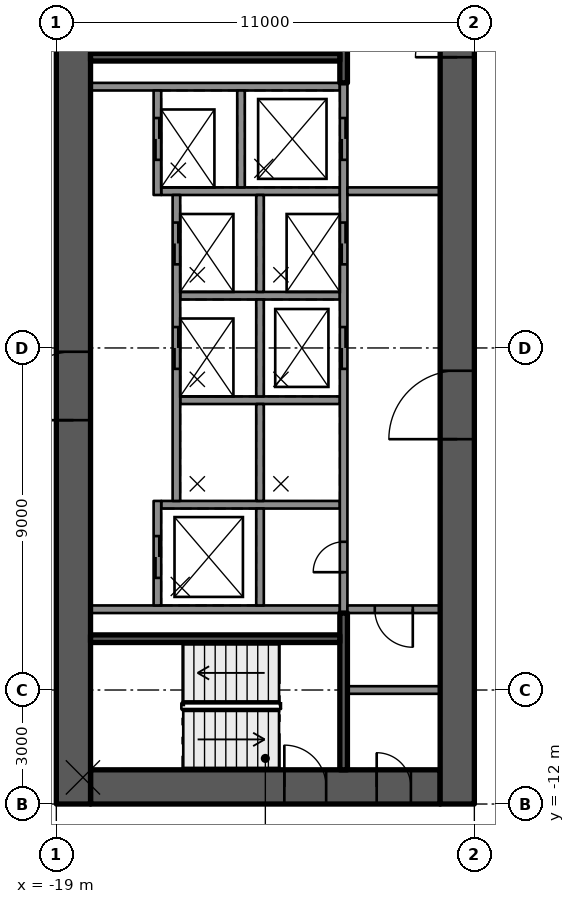
"""IFC4 building model, lengths in metres.
Left out: names, types, materials, properties, quantities, classifications, styles, units other than length and angle.
Written with IfcOpenShell. Run it as: python <this file> out.ifc"""

import sys

from ifc_helpers import new_model, si_unit, direction, frame, frame_2d, origin, place, context, subcontext, project, spatial, rectangle, extrude, element, fill, save


model = new_model("IFC4")
c1 = context("Model", 3, precision=1e-05, world=origin(), true_north=direction((0.0, 1.0)))
c2 = subcontext(c1, "Body", "Model", "MODEL_VIEW")
j1 = project(units=[si_unit("LENGTHUNIT", "METRE"), si_unit("PLANEANGLEUNIT", "RADIAN")], contexts=[c1])
p1 = place(None, origin())
s1 = spatial("IfcSite", under=j1, at=p1, CompositionType="ELEMENT")
p2 = place(p1, origin())
s2 = spatial("IfcBuilding", under=s1, at=p2, CompositionType="ELEMENT")
p3 = place(p2, frame((0.0, 0.0, 62.3)))
s3 = spatial("IfcBuildingStorey", under=s2, at=p3, CompositionType="ELEMENT", Elevation=62.3)
p4 = place(p3, frame((-18.1, -11.55, 0.0), z_axis=(0.0, 0.0, 1.0), x_axis=(1.0, 0.0, 0.0)))
e1 = element("IfcWall", 1, at=p4, inside=s3, PredefinedType="SHEAR", context=c2, shape_type="SweptSolid", body=[
    extrude(rectangle(XDim=9.2, YDim=0.9, at=frame_2d((4.6, 0.0))), origin(), (0.0, 0.0, 1.0), 3.5),
])
p5 = place(p4, frame((5.1, 0.0, 0.0)))
e2 = element("IfcOpeningElement", 2, at=p5, cuts=e1, PredefinedType="OPENING", context=c2, shape_type="SweptSolid", body=[
    extrude(rectangle(XDim=1.1, YDim=2.1, at=frame_2d((0.55, 1.05))), frame((0.0, 0.46, 0.0), z_axis=(0.0, -1.0, 0.0), x_axis=(1.0, 0.0, 0.0)), (0.0, 0.0, 1.0), 0.92),
])
p6 = place(p4, frame((7.53, 0.0, 0.0)))
e3 = element("IfcOpeningElement", 3, at=p6, cuts=e1, PredefinedType="OPENING", context=c2, shape_type="SweptSolid", body=[
    extrude(rectangle(XDim=0.9, YDim=2.1, at=frame_2d((0.45, 1.05))), frame((0.0, 0.46, 0.0), z_axis=(0.0, -1.0, 0.0), x_axis=(1.0, 0.0, 0.0)), (0.0, 0.0, 1.0), 0.92),
])
p7 = place(p3, frame((-18.55, -12.0, 0.0), z_axis=(0.0, 0.0, 1.0), x_axis=(0.0, 1.0, 0.0)))
e4 = element("IfcWall", 4, at=p7, inside=s3, PredefinedType="SHEAR", context=c2, shape_type="SweptSolid", body=[
    extrude(rectangle(XDim=24.0, YDim=0.9, at=frame_2d((12.0, 0.0))), origin(), (0.0, 0.0, 1.0), 3.5),
])
p8 = place(p7, frame((10.1, 0.0, 0.0)))
e5 = element("IfcOpeningElement", 5, at=p8, cuts=e4, PredefinedType="OPENING", context=c2, shape_type="SweptSolid", body=[
    extrude(rectangle(XDim=1.8, YDim=2.1, at=frame_2d((0.9, 1.05))), frame((0.0, 0.46, 0.0), z_axis=(0.0, -1.0, 0.0), x_axis=(1.0, 0.0, 0.0)), (0.0, 0.0, 1.0), 0.92),
])
p9 = place(p3, frame((-8.45, -12.0, 0.0), z_axis=(0.0, 0.0, 1.0), x_axis=(0.0, 1.0, 0.0)))
e6 = element("IfcWall", 6, at=p9, inside=s3, PredefinedType="SHEAR", context=c2, shape_type="SweptSolid", body=[
    extrude(rectangle(XDim=24.0, YDim=0.9, at=frame_2d((12.0, 0.0))), origin(), (0.0, 0.0, 1.0), 3.5),
])
p10 = place(p9, frame((9.6, 0.0, 0.0)))
e7 = element("IfcOpeningElement", 7, at=p10, cuts=e6, PredefinedType="OPENING", context=c2, shape_type="SweptSolid", body=[
    extrude(rectangle(XDim=1.8, YDim=2.1, at=frame_2d((0.9, 1.05))), frame((0.0, 0.46, 0.0), z_axis=(0.0, -1.0, 0.0), x_axis=(1.0, 0.0, 0.0)), (0.0, 0.0, 1.0), 0.92),
])
p11 = place(p9, frame((19.65, 0.0, 0.0)))
e8 = element("IfcOpeningElement", 8, at=p11, cuts=e6, PredefinedType="OPENING", context=c2, shape_type="SweptSolid", body=[
    extrude(rectangle(XDim=1.1, YDim=2.1, at=frame_2d((0.55, 1.05))), frame((0.0, 0.46, 0.0), z_axis=(0.0, -1.0, 0.0), x_axis=(1.0, 0.0, 0.0)), (0.0, 0.0, 1.0), 0.92),
])
for number, where, z_axis, x_axis in (
    (9, (-11.54, 6.875, 0.0), (0.0, 0.0, 1.0), (-1.0, 0.0, 0.0)),
    (10, (-11.54, -6.875, 0.0), (0.0, 0.0, 1.0), (-1.0, 0.0, 0.0)),
):
    element("IfcWall", number, at=place(p3, frame(where, z_axis=z_axis, x_axis=x_axis)), inside=s3, PredefinedType="SOLIDWALL", context=c2, shape_type="SweptSolid", body=[
        extrude(rectangle(XDim=6.56, YDim=0.2, at=frame_2d((3.28, 0.0))), origin(), (0.0, 0.0, 1.0), 3.09),
    ])
p12 = place(p3, frame((-11.54, -4.125, 0.0), z_axis=(0.0, 0.0, 1.0), x_axis=(-1.0, 0.0, 0.0)))
e11 = element("IfcWall", 11, at=p12, inside=s3, PredefinedType="SOLIDWALL", context=c2, shape_type="SweptSolid", body=[
    extrude(rectangle(XDim=4.7, YDim=0.2, at=frame_2d((2.35, 0.0))), origin(), (0.0, 0.0, 1.0), 3.09),
])
for number, where, z_axis, x_axis in (
    (12, (-11.54, -1.375, 0.0), (0.0, 0.0, 1.0), (-1.0, 0.0, 0.0)),
    (13, (-11.54, 1.375, 0.0), (0.0, 0.0, 1.0), (-1.0, 0.0, 0.0)),
):
    element("IfcWall", number, at=place(p3, frame(where, z_axis=z_axis, x_axis=x_axis)), inside=s3, PredefinedType="SOLIDWALL", context=c2, shape_type="SweptSolid", body=[
        extrude(rectangle(XDim=4.2, YDim=0.2, at=frame_2d((2.1, 0.0))), origin(), (0.0, 0.0, 1.0), 3.09),
    ])
p13 = place(p3, frame((-11.54, 4.125, 0.0), z_axis=(0.0, 0.0, 1.0), x_axis=(-1.0, 0.0, 0.0)))
e14 = element("IfcWall", 14, at=p13, inside=s3, PredefinedType="SOLIDWALL", context=c2, shape_type="SweptSolid", body=[
    extrude(rectangle(XDim=4.7, YDim=0.2, at=frame_2d((2.35, 0.0))), origin(), (0.0, 0.0, 1.0), 3.09),
])
p14 = place(p3, frame((-11.44, -6.975, 0.0), z_axis=(0.0, 0.0, 1.0), x_axis=(0.0, 1.0, 0.0)))
e15 = element("IfcWall", 15, at=p14, inside=s3, PredefinedType="SOLIDWALL", context=c2, shape_type="SweptSolid", body=[
    extrude(rectangle(XDim=13.95, YDim=0.2, at=frame_2d((6.975, 0.0))), origin(), (0.0, 0.0, 1.0), 3.09),
])
p15 = place(p14, frame((6.425, 0.0, 0.0)))
e16 = element("IfcOpeningElement", 16, at=p15, cuts=e15, PredefinedType="OPENING", context=c2, shape_type="SweptSolid", body=[
    extrude(rectangle(XDim=1.1, YDim=2.1, at=frame_2d((0.55, 1.05))), frame((0.0, 0.11, 0.0), z_axis=(0.0, -1.0, 0.0), x_axis=(1.0, 0.0, 0.0)), (0.0, 0.0, 1.0), 0.22),
])
p16 = place(p14, frame((9.175, 0.0, 0.0)))
e17 = element("IfcOpeningElement", 17, at=p16, cuts=e15, PredefinedType="OPENING", context=c2, shape_type="SweptSolid", body=[
    extrude(rectangle(XDim=1.1, YDim=2.1, at=frame_2d((0.55, 1.05))), frame((0.0, 0.11, 0.0), z_axis=(0.0, -1.0, 0.0), x_axis=(1.0, 0.0, 0.0)), (0.0, 0.0, 1.0), 0.22),
])
p17 = place(p14, frame((11.925, 0.0, 0.0)))
e18 = element("IfcOpeningElement", 18, at=p17, cuts=e15, PredefinedType="OPENING", context=c2, shape_type="SweptSolid", body=[
    extrude(rectangle(XDim=1.1, YDim=2.1, at=frame_2d((0.55, 1.05))), frame((0.0, 0.11, 0.0), z_axis=(0.0, -1.0, 0.0), x_axis=(1.0, 0.0, 0.0)), (0.0, 0.0, 1.0), 0.22),
])
p18 = place(p14, frame((1.075, 0.0, 0.0)))
e19 = element("IfcOpeningElement", 19, at=p18, cuts=e15, PredefinedType="OPENING", context=c2, shape_type="SweptSolid", body=[
    extrude(rectangle(XDim=0.8, YDim=2.1, at=frame_2d((0.4, 1.05))), frame((0.0, 0.11, 0.0), z_axis=(0.0, -1.0, 0.0), x_axis=(1.0, 0.0, 0.0)), (0.0, 0.0, 1.0), 0.22),
])
for number, where, z_axis, x_axis in (
    (20, (-13.64, -6.775, 0.0), (0.0, 0.0, 1.0), (0.0, 1.0, 0.0)),
    (21, (-13.64, -4.025, 0.0), (0.0, 0.0, 1.0), (0.0, 1.0, 0.0)),
    (22, (-13.64, -1.275, 0.0), (0.0, 0.0, 1.0), (0.0, 1.0, 0.0)),
    (23, (-13.64, 1.475, 0.0), (0.0, 0.0, 1.0), (0.0, 1.0, 0.0)),
    (24, (-14.14, 4.225, 0.0), (0.0, 0.0, 1.0), (0.0, 1.0, 0.0)),
):
    element("IfcWall", number, at=place(p3, frame(where, z_axis=z_axis, x_axis=x_axis)), inside=s3, PredefinedType="SOLIDWALL", context=c2, shape_type="SweptSolid", body=[
        extrude(rectangle(XDim=2.55, YDim=0.2, at=frame_2d((1.275, 0.0))), origin(), (0.0, 0.0, 1.0), 3.09),
    ])
p19 = place(p3, frame((-16.34, -6.775, 0.0), z_axis=(0.0, 0.0, 1.0), x_axis=(0.0, 1.0, 0.0)))
e25 = element("IfcWall", 25, at=p19, inside=s3, PredefinedType="SOLIDWALL", context=c2, shape_type="SweptSolid", body=[
    extrude(rectangle(XDim=2.75, YDim=0.2, at=frame_2d((1.375, 0.0))), origin(), (0.0, 0.0, 1.0), 3.09),
])
p20 = place(p19, frame((0.725, 0.0, 0.0)))
e26 = element("IfcOpeningElement", 26, at=p20, cuts=e25, PredefinedType="OPENING", context=c2, shape_type="SweptSolid", body=[
    extrude(rectangle(XDim=1.1, YDim=2.1, at=frame_2d((0.55, 1.05))), frame((0.0, 0.11, 0.0), z_axis=(0.0, -1.0, 0.0), x_axis=(1.0, 0.0, 0.0)), (0.0, 0.0, 1.0), 0.22),
])
p21 = place(p3, frame((-15.84, -4.025, 0.0), z_axis=(0.0, 0.0, 1.0), x_axis=(0.0, 1.0, 0.0)))
e27 = element("IfcWall", 27, at=p21, inside=s3, PredefinedType="SOLIDWALL", context=c2, shape_type="SweptSolid", body=[
    extrude(rectangle(XDim=8.05, YDim=0.2, at=frame_2d((4.025, 0.0))), origin(), (0.0, 0.0, 1.0), 3.09),
])
p22 = place(p21, frame((3.475, 0.0, 0.0)))
e28 = element("IfcOpeningElement", 28, at=p22, cuts=e27, PredefinedType="OPENING", context=c2, shape_type="SweptSolid", body=[
    extrude(rectangle(XDim=1.1, YDim=2.1, at=frame_2d((0.55, 1.05))), frame((0.0, 0.11, 0.0), z_axis=(0.0, -1.0, 0.0), x_axis=(1.0, 0.0, 0.0)), (0.0, 0.0, 1.0), 0.22),
])
p23 = place(p21, frame((6.225, 0.0, 0.0)))
e29 = element("IfcOpeningElement", 29, at=p23, cuts=e27, PredefinedType="OPENING", context=c2, shape_type="SweptSolid", body=[
    extrude(rectangle(XDim=1.1, YDim=2.1, at=frame_2d((0.55, 1.05))), frame((0.0, 0.11, 0.0), z_axis=(0.0, -1.0, 0.0), x_axis=(1.0, 0.0, 0.0)), (0.0, 0.0, 1.0), 0.22),
])
p24 = place(p3, frame((-16.34, 4.025, 0.0), z_axis=(0.0, 0.0, 1.0), x_axis=(0.0, 1.0, 0.0)))
e30 = element("IfcWall", 30, at=p24, inside=s3, PredefinedType="SOLIDWALL", context=c2, shape_type="SweptSolid", body=[
    extrude(rectangle(XDim=2.75, YDim=0.2, at=frame_2d((1.375, 0.0))), origin(), (0.0, 0.0, 1.0), 3.09),
])
p25 = place(p24, frame((0.925, 0.0, 0.0)))
e31 = element("IfcOpeningElement", 31, at=p25, cuts=e30, PredefinedType="OPENING", context=c2, shape_type="SweptSolid", body=[
    extrude(rectangle(XDim=1.1, YDim=2.1, at=frame_2d((0.55, 1.05))), frame((0.0, 0.11, 0.0), z_axis=(0.0, -1.0, 0.0), x_axis=(1.0, 0.0, 0.0)), (0.0, 0.0, 1.0), 0.22),
])
p26 = place(p3, frame((-11.44, 6.975, 0.0), z_axis=(0.0, 0.0, 1.0), x_axis=(0.0, 1.0, 0.0)))
e32 = element("IfcWall", 32, at=p26, inside=s3, PredefinedType="SOLIDWALL", context=c2, shape_type="SweptSolid", body=[
    extrude(rectangle(XDim=4.125, YDim=0.2, at=frame_2d((2.062, 0.0))), origin(), (0.0, 0.0, 1.0), 3.09),
])
p27 = place(p26, frame((2.1, 0.0, 0.0)))
e33 = element("IfcOpeningElement", 33, at=p27, cuts=e32, PredefinedType="OPENING", context=c2, shape_type="SweptSolid", body=[
    extrude(rectangle(XDim=1.1, YDim=2.1, at=frame_2d((0.55, 1.05))), frame((0.0, 0.11, 0.0), z_axis=(0.0, -1.0, 0.0), x_axis=(1.0, 0.0, 0.0)), (0.0, 0.0, 1.0), 0.22),
])
p28 = place(p3, frame((-11.54, 7.65, 0.0), z_axis=(0.0, 0.0, 1.0), x_axis=(-1.0, 0.0, 0.0)))
e34 = element("IfcWall", 34, at=p28, inside=s3, PredefinedType="SOLIDWALL", context=c2, shape_type="SweptSolid", body=[
    extrude(rectangle(XDim=6.56, YDim=0.2, at=frame_2d((3.28, 0.0))), origin(), (0.0, 0.0, 1.0), 3.09),
])
p29 = place(p3, frame((-11.44, -11.1, 0.0), z_axis=(0.0, 0.0, 1.0), x_axis=(0.0, 1.0, 0.0)))
e35 = element("IfcWall", 35, at=p29, inside=s3, PredefinedType="SOLIDWALL", context=c2, shape_type="SweptSolid", body=[
    extrude(rectangle(XDim=4.125, YDim=0.2, at=frame_2d((2.062, 0.0))), origin(), (0.0, 0.0, 1.0), 3.09),
])
p30 = place(p3, frame((-11.54, -7.65, 0.0), z_axis=(0.0, 0.0, 1.0), x_axis=(-1.0, 0.0, 0.0)))
e36 = element("IfcWall", 36, at=p30, inside=s3, PredefinedType="SOLIDWALL", context=c2, shape_type="SweptSolid", body=[
    extrude(rectangle(XDim=6.56, YDim=0.2, at=frame_2d((3.28, 0.0))), origin(), (0.0, 0.0, 1.0), 3.09),
])
p31 = place(p3, frame((-8.9, 4.125, 0.0), z_axis=(0.0, 0.0, 1.0), x_axis=(-1.0, 0.0, 0.0)))
e37 = element("IfcWall", 37, at=p31, inside=s3, PredefinedType="PARTITIONING", context=c2, shape_type="SweptSolid", body=[
    extrude(rectangle(XDim=2.44, YDim=0.2, at=frame_2d((1.22, 0.0))), origin(), (0.0, 0.0, 1.0), 3.09),
])
p32 = place(p3, frame((-8.9, -6.875, 0.0), z_axis=(0.0, 0.0, 1.0), x_axis=(-1.0, 0.0, 0.0)))
e38 = element("IfcWall", 38, at=p32, inside=s3, PredefinedType="PARTITIONING", context=c2, shape_type="SweptSolid", body=[
    extrude(rectangle(XDim=2.44, YDim=0.2, at=frame_2d((1.22, 0.0))), origin(), (0.0, 0.0, 1.0), 3.09),
])
p33 = place(p32, frame((0.72, 0.0, 0.0)))
e39 = element("IfcOpeningElement", 39, at=p33, cuts=e38, PredefinedType="OPENING", context=c2, shape_type="SweptSolid", body=[
    extrude(rectangle(XDim=1.0, YDim=2.1, at=frame_2d((0.5, 1.05))), frame((0.0, 0.11, 0.0), z_axis=(0.0, -1.0, 0.0), x_axis=(1.0, 0.0, 0.0)), (0.0, 0.0, 1.0), 0.22),
])
p34 = place(p3, frame((-8.9, -9.0, 0.0), z_axis=(0.0, 0.0, 1.0), x_axis=(-1.0, 0.0, 0.0)))
e40 = element("IfcWall", 40, at=p34, inside=s3, PredefinedType="PARTITIONING", context=c2, shape_type="SweptSolid", body=[
    extrude(rectangle(XDim=2.44, YDim=0.2, at=frame_2d((1.22, 0.0))), origin(), (0.0, 0.0, 1.0), 3.09),
])
p35 = place(p20, origin())
e41 = element("IfcDoor", 41, at=p35, inside=s3, OperationType="DOUBLE_DOOR_SLIDING", PredefinedType="DOOR", context=c2, shape_type="SweptSolid", body=[
    extrude(rectangle(XDim=1.1, YDim=2.1, at=frame_2d((0.55, 1.05))), frame((0.0, 0.025, 0.0), z_axis=(0.0, -1.0, 0.0), x_axis=(1.0, 0.0, 0.0)), (0.0, 0.0, 1.0), 0.05),
])
fill(e26, e41)
p36 = place(p15, origin())
e42 = element("IfcDoor", 42, at=p36, inside=s3, OperationType="DOUBLE_DOOR_SLIDING", PredefinedType="DOOR", context=c2, shape_type="SweptSolid", body=[
    extrude(rectangle(XDim=1.1, YDim=2.1, at=frame_2d((0.55, 1.05))), frame((0.0, 0.025, 0.0), z_axis=(0.0, -1.0, 0.0), x_axis=(1.0, 0.0, 0.0)), (0.0, 0.0, 1.0), 0.05),
])
fill(e16, e42)
p37 = place(p22, origin())
e43 = element("IfcDoor", 43, at=p37, inside=s3, OperationType="DOUBLE_DOOR_SLIDING", PredefinedType="DOOR", context=c2, shape_type="SweptSolid", body=[
    extrude(rectangle(XDim=1.1, YDim=2.1, at=frame_2d((0.55, 1.05))), frame((0.0, 0.025, 0.0), z_axis=(0.0, -1.0, 0.0), x_axis=(1.0, 0.0, 0.0)), (0.0, 0.0, 1.0), 0.05),
])
fill(e28, e43)
p38 = place(p16, origin())
e44 = element("IfcDoor", 44, at=p38, inside=s3, OperationType="DOUBLE_DOOR_SLIDING", PredefinedType="DOOR", context=c2, shape_type="SweptSolid", body=[
    extrude(rectangle(XDim=1.1, YDim=2.1, at=frame_2d((0.55, 1.05))), frame((0.0, 0.025, 0.0), z_axis=(0.0, -1.0, 0.0), x_axis=(1.0, 0.0, 0.0)), (0.0, 0.0, 1.0), 0.05),
])
fill(e17, e44)
p39 = place(p23, origin())
e45 = element("IfcDoor", 45, at=p39, inside=s3, OperationType="DOUBLE_DOOR_SLIDING", PredefinedType="DOOR", context=c2, shape_type="SweptSolid", body=[
    extrude(rectangle(XDim=1.1, YDim=2.1, at=frame_2d((0.55, 1.05))), frame((0.0, 0.025, 0.0), z_axis=(0.0, -1.0, 0.0), x_axis=(1.0, 0.0, 0.0)), (0.0, 0.0, 1.0), 0.05),
])
fill(e29, e45)
p40 = place(p17, origin())
e46 = element("IfcDoor", 46, at=p40, inside=s3, OperationType="DOUBLE_DOOR_SLIDING", PredefinedType="DOOR", context=c2, shape_type="SweptSolid", body=[
    extrude(rectangle(XDim=1.1, YDim=2.1, at=frame_2d((0.55, 1.05))), frame((0.0, 0.025, 0.0), z_axis=(0.0, -1.0, 0.0), x_axis=(1.0, 0.0, 0.0)), (0.0, 0.0, 1.0), 0.05),
])
fill(e18, e46)
p41 = place(p25, origin())
e47 = element("IfcDoor", 47, at=p41, inside=s3, OperationType="DOUBLE_DOOR_SLIDING", PredefinedType="DOOR", context=c2, shape_type="SweptSolid", body=[
    extrude(rectangle(XDim=1.1, YDim=2.1, at=frame_2d((0.55, 1.05))), frame((0.0, 0.025, 0.0), z_axis=(0.0, -1.0, 0.0), x_axis=(1.0, 0.0, 0.0)), (0.0, 0.0, 1.0), 0.05),
])
fill(e31, e47)
p42 = place(p18, origin())
e48 = element("IfcDoor", 48, at=p42, inside=s3, OperationType="SINGLE_SWING_LEFT", PredefinedType="DOOR", context=c2, shape_type="SweptSolid", body=[
    extrude(rectangle(XDim=0.8, YDim=2.1, at=frame_2d((0.4, 1.05))), frame((0.0, 0.025, 0.0), z_axis=(0.0, -1.0, 0.0), x_axis=(1.0, 0.0, 0.0)), (0.0, 0.0, 1.0), 0.05),
])
fill(e19, e48)
p43 = place(p10, origin())
e49 = element("IfcDoor", 49, at=p43, inside=s3, OperationType="SINGLE_SWING_LEFT", PredefinedType="DOOR", context=c2, shape_type="SweptSolid", body=[
    extrude(rectangle(XDim=1.8, YDim=2.1, at=frame_2d((0.9, 1.05))), frame((0.0, 0.025, 0.0), z_axis=(0.0, -1.0, 0.0), x_axis=(1.0, 0.0, 0.0)), (0.0, 0.0, 1.0), 0.05),
])
fill(e7, e49)
p44 = place(p8, origin())
e50 = element("IfcDoor", 50, at=p44, inside=s3, OperationType="SINGLE_SWING_LEFT", PredefinedType="DOOR", context=c2, shape_type="SweptSolid", body=[
    extrude(rectangle(XDim=1.8, YDim=2.1, at=frame_2d((0.9, 1.05))), frame((0.0, 0.025, 0.0), z_axis=(0.0, -1.0, 0.0), x_axis=(1.0, 0.0, 0.0)), (0.0, 0.0, 1.0), 0.05),
])
fill(e5, e50)
p45 = place(p11, origin())
e51 = element("IfcDoor", 51, at=p45, inside=s3, OperationType="SINGLE_SWING_RIGHT", PredefinedType="DOOR", context=c2, shape_type="SweptSolid", body=[
    extrude(rectangle(XDim=1.1, YDim=2.1, at=frame_2d((0.55, 1.05))), frame((0.0, 0.025, 0.0), z_axis=(0.0, -1.0, 0.0), x_axis=(1.0, 0.0, 0.0)), (0.0, 0.0, 1.0), 0.05),
])
fill(e8, e51)
p46 = place(p5, origin())
e52 = element("IfcDoor", 52, at=p46, inside=s3, OperationType="SINGLE_SWING_RIGHT", PredefinedType="DOOR", context=c2, shape_type="SweptSolid", body=[
    extrude(rectangle(XDim=1.1, YDim=2.1, at=frame_2d((0.55, 1.05))), frame((0.0, 0.025, 0.0), z_axis=(0.0, -1.0, 0.0), x_axis=(1.0, 0.0, 0.0)), (0.0, 0.0, 1.0), 0.05),
])
fill(e2, e52)
p47 = place(p6, origin())
e53 = element("IfcDoor", 53, at=p47, inside=s3, OperationType="SINGLE_SWING_RIGHT", PredefinedType="DOOR", context=c2, shape_type="SweptSolid", body=[
    extrude(rectangle(XDim=0.9, YDim=2.1, at=frame_2d((0.45, 1.05))), frame((0.0, 0.025, 0.0), z_axis=(0.0, -1.0, 0.0), x_axis=(1.0, 0.0, 0.0)), (0.0, 0.0, 1.0), 0.05),
])
fill(e3, e53)
p48 = place(p33, origin())
e54 = element("IfcDoor", 54, at=p48, inside=s3, OperationType="SINGLE_SWING_RIGHT", PredefinedType="DOOR", context=c2, shape_type="SweptSolid", body=[
    extrude(rectangle(XDim=1.0, YDim=2.1, at=frame_2d((0.5, 1.05))), frame((0.0, 0.025, 0.0), z_axis=(0.0, -1.0, 0.0), x_axis=(1.0, 0.0, 0.0)), (0.0, 0.0, 1.0), 0.05),
])
fill(e39, e54)
save(model, sys.argv[1])
